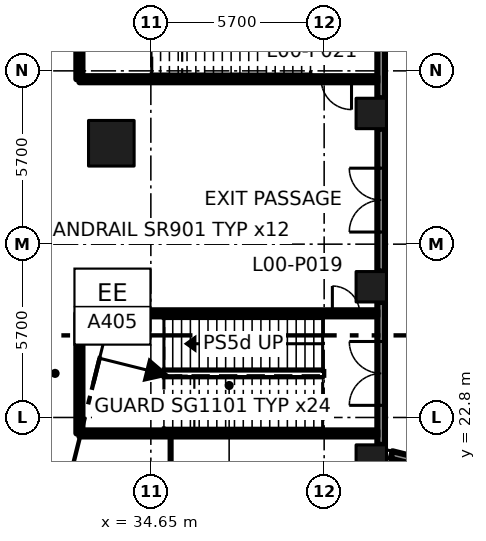
"""IFC4 building model, lengths in metres.
Left out: names, types, materials, properties, quantities, classifications, styles, units other than length and angle.
Written with IfcOpenShell. Run it as: python <this file> out.ifc"""

import sys

from ifc_helpers import new_model, si_unit, direction, frame, frame_2d, origin, origin_2d, place, context, subcontext, project, spatial, rectangle, extrude, element, fill, save


model = new_model("IFC4")
c1 = context("Model", 3, precision=1e-05, world=origin(), true_north=direction((0.0, 1.0)))
c2 = subcontext(c1, "Body", "Model", "MODEL_VIEW")
j1 = project(units=[si_unit("LENGTHUNIT", "METRE"), si_unit("PLANEANGLEUNIT", "RADIAN")], contexts=[c1])
p1 = place(None, origin())
s1 = spatial("IfcSite", under=j1, at=p1, CompositionType="ELEMENT")
p2 = place(p1, origin())
s2 = spatial("IfcBuilding", under=s1, at=p2, CompositionType="ELEMENT")
p3 = place(p2, origin())
s3 = spatial("IfcBuildingStorey", under=s2, at=p3, CompositionType="ELEMENT", Elevation=0.0)
for number, where, z_axis, x_axis in (
    (1, (33.35, 26.119, 0.0), (0.0, 0.0, 1.0), (1.0, 0.0, 0.0)),
    (2, (33.35, 31.819, 0.0), (0.0, 0.0, 1.0), (1.0, 0.0, 0.0)),
):
    element("IfcColumn", number, at=place(p3, frame(where, z_axis=z_axis, x_axis=x_axis)), inside=s3, PredefinedType="COLUMN", context=c2, shape_type="SweptSolid", body=[
        extrude(rectangle(XDim=1.5, YDim=1.5, at=origin_2d()), origin(), (0.0, 0.0, 1.0), 7.2),
    ])
for number, where, z_axis, x_axis in (
    (3, (41.9, 21.399, 0.0), (0.0, 0.0, 1.0), (1.0, 0.0, 0.0)),
    (4, (41.9, 27.099, 0.0), (0.0, 0.0, 1.0), (1.0, 0.0, 0.0)),
    (5, (41.9, 32.799, 0.0), (0.0, 0.0, 1.0), (1.0, 0.0, 0.0)),
):
    element("IfcColumn", number, at=place(p3, frame(where, z_axis=z_axis, x_axis=x_axis)), inside=s3, PredefinedType="COLUMN", context=c2, shape_type="SweptSolid", body=[
        extrude(rectangle(XDim=1.0, YDim=1.0, at=origin_2d()), origin(), (0.0, 0.0, 1.0), 7.2),
    ])
p4 = place(p3, frame((32.3, 22.275, 0.0), z_axis=(0.0, 0.0, 1.0), x_axis=(0.0, 1.0, 0.0)))
e6 = element("IfcWall", 6, at=p4, inside=s3, PredefinedType="SOLIDWALL", context=c2, shape_type="SweptSolid", body=[
    extrude(rectangle(XDim=3.95, YDim=0.2, at=frame_2d((1.975, 0.0))), origin(), (0.0, 0.0, 1.0), 6.75),
])
p5 = place(p3, frame((32.3, 33.925, 0.0), z_axis=(0.0, 0.0, 1.0), x_axis=(0.0, 1.0, 0.0)))
e7 = element("IfcWall", 7, at=p5, inside=s3, PredefinedType="SOLIDWALL", context=c2, shape_type="SweptSolid", body=[
    extrude(rectangle(XDim=4.75, YDim=0.2, at=frame_2d((2.375, 0.0))), origin(), (0.0, 0.0, 1.0), 6.75),
])
p6 = place(p3, frame((34.12, 26.225, 0.0), z_axis=(0.0, 0.0, 1.0), x_axis=(1.0, 0.0, 0.0)))
e8 = element("IfcWall", 8, at=p6, inside=s3, PredefinedType="SOLIDWALL", context=c2, shape_type="SweptSolid", body=[
    extrude(rectangle(XDim=7.98, YDim=0.2, at=frame_2d((3.99, 0.0))), origin(), (0.0, 0.0, 1.0), 6.75),
])
p7 = place(p6, frame((6.5, 0.0, 0.0)))
e9 = element("IfcOpeningElement", 9, at=p7, cuts=e8, PredefinedType="OPENING", context=c2, shape_type="SweptSolid", body=[
    extrude(rectangle(XDim=0.9, YDim=2.1, at=frame_2d((0.45, 1.05))), frame((0.0, 0.11, 0.0), z_axis=(0.0, -1.0, 0.0), x_axis=(1.0, 0.0, 0.0)), (0.0, 0.0, 1.0), 0.22),
])
p8 = place(p3, frame((35.3, 10.074, 0.0), z_axis=(0.0, 0.0, 1.0), x_axis=(0.0, 1.0, 0.0)))
e10 = element("IfcWall", 10, at=p8, inside=s3, PredefinedType="PARTITIONING", context=c2, shape_type="SweptSolid", body=[
    extrude(rectangle(XDim=12.201, YDim=0.1, at=frame_2d((6.101, 0.0))), origin(), (0.0, 0.0, 1.0), 6.75),
])
p9 = place(p8, frame((1.88, 0.0, 0.0)))
e11 = element("IfcOpeningElement", 11, at=p9, cuts=e10, PredefinedType="OPENING", context=c2, shape_type="SweptSolid", body=[
    extrude(rectangle(XDim=1.0, YDim=2.1, at=frame_2d((0.5, 1.05))), frame((0.0, 0.06, 0.0), z_axis=(0.0, -1.0, 0.0), x_axis=(1.0, 0.0, 0.0)), (0.0, 0.0, 1.0), 0.12),
])
p10 = place(p8, frame((8.006, 0.0, 0.0)))
e12 = element("IfcOpeningElement", 12, at=p10, cuts=e10, PredefinedType="OPENING", context=c2, shape_type="SweptSolid", body=[
    extrude(rectangle(XDim=1.0, YDim=2.1, at=frame_2d((0.5, 1.05))), frame((0.0, 0.06, 0.0), z_axis=(0.0, -1.0, 0.0), x_axis=(1.0, 0.0, 0.0)), (0.0, 0.0, 1.0), 0.12),
])
p11 = place(p3, frame((35.3, 22.275, 0.0), z_axis=(0.0, 0.0, 1.0), x_axis=(-1.0, 0.0, 0.0)))
e13 = element("IfcWall", 13, at=p11, inside=s3, PredefinedType="SOLIDWALL", context=c2, shape_type="SweptSolid", body=[
    extrude(rectangle(XDim=3.0, YDim=0.2, at=frame_2d((1.5, 0.0))), origin(), (0.0, 0.0, 1.0), 6.75),
])
p12 = place(p3, frame((42.1, 33.925, 0.0), z_axis=(0.0, 0.0, 1.0), x_axis=(-1.0, 0.0, 0.0)))
e14 = element("IfcWall", 14, at=p12, inside=s3, PredefinedType="SOLIDWALL", context=c2, shape_type="SweptSolid", body=[
    extrude(rectangle(XDim=9.8, YDim=0.2, at=frame_2d((4.9, 0.0))), origin(), (0.0, 0.0, 1.0), 6.75),
])
p13 = place(p12, frame((0.85, 0.0, 0.0)))
e15 = element("IfcOpeningElement", 15, at=p13, cuts=e14, PredefinedType="OPENING", context=c2, shape_type="SweptSolid", body=[
    extrude(rectangle(XDim=1.0, YDim=2.1, at=frame_2d((0.5, 1.05))), frame((0.0, 0.11, 0.0), z_axis=(0.0, -1.0, 0.0), x_axis=(1.0, 0.0, 0.0)), (0.0, 0.0, 1.0), 0.22),
])
p14 = place(p3, frame((35.3, 22.275, 0.0), z_axis=(0.0, 0.0, 1.0), x_axis=(1.0, 0.0, 0.0)))
e16 = element("IfcWall", 16, at=p14, inside=s3, PredefinedType="SOLIDWALL", context=c2, shape_type="SweptSolid", body=[
    extrude(rectangle(XDim=6.8, YDim=0.2, at=frame_2d((3.4, 0.0))), origin(), (0.0, 0.0, 1.0), 6.75),
])
p15 = place(p3, frame((46.922, 20.482, 0.0), z_axis=(0.0, 0.0, 1.0), x_axis=(-0.970279921141, 0.241985277715, 0.0)))
e17 = element("IfcWall", 17, at=p15, inside=s3, PredefinedType="SOLIDWALL", context=c2, shape_type="SweptSolid", body=[
    extrude(rectangle(XDim=4.489, YDim=0.25, at=frame_2d((2.244, 0.0))), origin(), (0.0, 0.0, 1.0), 5.85),
])
p16 = place(p15, frame((1.397, 0.0, 0.9)))
e18 = element("IfcOpeningElement", 18, at=p16, cuts=e17, PredefinedType="OPENING", context=c2, shape_type="SweptSolid", body=[
    extrude(rectangle(XDim=2.4, YDim=4.5, at=frame_2d((1.2, 2.25))), frame((0.0, 0.135, 0.0), z_axis=(0.0, -1.0, 0.0), x_axis=(1.0, 0.0, 0.0)), (0.0, 0.0, 1.0), 0.27),
])
p17 = place(p3, frame((42.225, 21.899, 0.0), z_axis=(0.0, 0.0, 1.0), x_axis=(0.0, 1.0, 0.0)))
e19 = element("IfcWall", 19, at=p17, inside=s3, PredefinedType="SOLIDWALL", context=c2, shape_type="SweptSolid", body=[
    extrude(rectangle(XDim=4.7, YDim=0.25, at=frame_2d((2.35, 0.0))), origin(), (0.0, 0.0, 1.0), 5.85),
])
p18 = place(p17, frame((1.3, 0.0, 0.0)))
e20 = element("IfcOpeningElement", 20, at=p18, cuts=e19, PredefinedType="OPENING", context=c2, shape_type="SweptSolid", body=[
    extrude(rectangle(XDim=2.1, YDim=2.4, at=frame_2d((1.05, 1.2))), frame((0.0, 0.135, 0.0), z_axis=(0.0, -1.0, 0.0), x_axis=(1.0, 0.0, 0.0)), (0.0, 0.0, 1.0), 0.27),
])
p19 = place(p3, frame((42.225, 27.599, 0.0), z_axis=(0.0, 0.0, 1.0), x_axis=(0.0, 1.0, 0.0)))
e21 = element("IfcWall", 21, at=p19, inside=s3, PredefinedType="SOLIDWALL", context=c2, shape_type="SweptSolid", body=[
    extrude(rectangle(XDim=4.7, YDim=0.25, at=frame_2d((2.35, 0.0))), origin(), (0.0, 0.0, 1.0), 5.85),
])
p20 = place(p19, frame((1.3, 0.0, 0.0)))
e22 = element("IfcOpeningElement", 22, at=p20, cuts=e21, PredefinedType="OPENING", context=c2, shape_type="SweptSolid", body=[
    extrude(rectangle(XDim=2.1, YDim=2.4, at=frame_2d((1.05, 1.2))), frame((0.0, 0.135, 0.0), z_axis=(0.0, -1.0, 0.0), x_axis=(1.0, 0.0, 0.0)), (0.0, 0.0, 1.0), 0.27),
])
p21 = place(p3, frame((42.225, 33.299, 0.0), z_axis=(0.0, 0.0, 1.0), x_axis=(0.0, 1.0, 0.0)))
e23 = element("IfcWall", 23, at=p21, inside=s3, PredefinedType="SOLIDWALL", context=c2, shape_type="SweptSolid", body=[
    extrude(rectangle(XDim=6.037, YDim=0.25, at=frame_2d((3.019, 0.0))), origin(), (0.0, 0.0, 1.0), 5.85),
])
p22 = place(p21, frame((1.968, 0.0, 0.0)))
e24 = element("IfcOpeningElement", 24, at=p22, cuts=e23, PredefinedType="OPENING", context=c2, shape_type="SweptSolid", body=[
    extrude(rectangle(XDim=2.1, YDim=2.4, at=frame_2d((1.05, 1.2))), frame((0.0, 0.135, 0.0), z_axis=(0.0, -1.0, 0.0), x_axis=(1.0, 0.0, 0.0)), (0.0, 0.0, 1.0), 0.27),
])
p23 = place(p7, origin())
e25 = element("IfcDoor", 25, at=p23, inside=s3, OperationType="SINGLE_SWING_LEFT", PredefinedType="DOOR", context=c2, shape_type="SweptSolid", body=[
    extrude(rectangle(XDim=0.9, YDim=2.1, at=frame_2d((0.45, 1.05))), frame((0.0, 0.025, 0.0), z_axis=(0.0, -1.0, 0.0), x_axis=(1.0, 0.0, 0.0)), (0.0, 0.0, 1.0), 0.05),
])
fill(e9, e25)
p24 = place(p13, origin())
e26 = element("IfcDoor", 26, at=p24, inside=s3, OperationType="SINGLE_SWING_LEFT", PredefinedType="DOOR", context=c2, shape_type="SweptSolid", body=[
    extrude(rectangle(XDim=1.0, YDim=2.1, at=frame_2d((0.5, 1.05))), frame((0.0, 0.025, 0.0), z_axis=(0.0, -1.0, 0.0), x_axis=(1.0, 0.0, 0.0)), (0.0, 0.0, 1.0), 0.05),
])
fill(e15, e26)
p25 = place(p18, origin())
e27 = element("IfcDoor", 27, at=p25, inside=s3, OperationType="DOUBLE_DOOR_DOUBLE_SWING", PredefinedType="DOOR", context=c2, shape_type="SweptSolid", body=[
    extrude(rectangle(XDim=2.1, YDim=2.4, at=frame_2d((1.05, 1.2))), frame((0.0, 0.025, 0.0), z_axis=(0.0, -1.0, 0.0), x_axis=(1.0, 0.0, 0.0)), (0.0, 0.0, 1.0), 0.05),
])
fill(e20, e27)
p26 = place(p20, origin())
e28 = element("IfcDoor", 28, at=p26, inside=s3, OperationType="DOUBLE_DOOR_DOUBLE_SWING", PredefinedType="DOOR", context=c2, shape_type="SweptSolid", body=[
    extrude(rectangle(XDim=2.1, YDim=2.4, at=frame_2d((1.05, 1.2))), frame((0.0, 0.025, 0.0), z_axis=(0.0, -1.0, 0.0), x_axis=(1.0, 0.0, 0.0)), (0.0, 0.0, 1.0), 0.05),
])
fill(e22, e28)
save(model, sys.argv[1])
